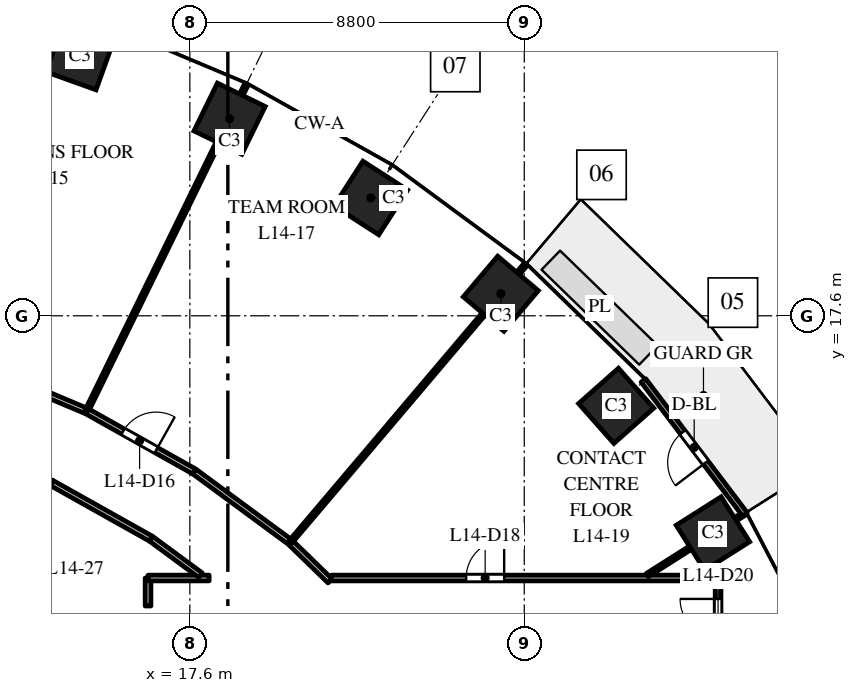
"""IFC4 building model, lengths in metres.
Left out: names, types, materials, properties, quantities, classifications, styles, units other than length and angle.
Written with IfcOpenShell. Run it as: python <this file> out.ifc"""

import sys

from ifc_helpers import new_model, si_unit, direction, frame, frame_2d, origin, origin_2d, place, context, subcontext, project, spatial, rectangle, extrude, element, fill, save


model = new_model("IFC4")
c1 = context("Model", 3, precision=1e-05, world=origin(), true_north=direction((0.0, 1.0)))
c2 = subcontext(c1, "Body", "Model", "MODEL_VIEW")
j1 = project(units=[si_unit("LENGTHUNIT", "METRE"), si_unit("PLANEANGLEUNIT", "RADIAN")], contexts=[c1])
p1 = place(None, origin())
s1 = spatial("IfcSite", under=j1, at=p1, CompositionType="ELEMENT")
p2 = place(p1, origin())
s2 = spatial("IfcBuilding", under=s1, at=p2, CompositionType="ELEMENT")
p3 = place(p2, frame((0.0, 0.0, 66.5)))
s3 = spatial("IfcBuildingStorey", under=s2, at=p3, CompositionType="ELEMENT", Elevation=66.5)
for number, where, z_axis, x_axis in (
    (1, (31.365, 11.871, 0.0), (0.0, 0.0, 1.0), (-0.535, 0.845, 0.0)),
    (2, (28.819, 15.23, 0.0), (0.0, 0.0, 1.0), (-0.663, 0.749, 0.0)),
    (3, (25.783, 18.18, 0.0), (0.0, 0.0, 1.0), (-0.763, 0.646, 0.0)),
    (4, (22.362, 20.7, 0.0), (0.0, 0.0, 1.0), (-0.84, 0.542, 0.0)),
    (5, (18.646, 22.785, 0.0), (0.0, 0.0, 1.0), (-0.898, 0.439, 0.0)),
    (6, (14.709, 24.441, 0.0), (0.0, 0.0, 1.0), (-0.941, 0.338, 0.0)),
):
    element("IfcColumn", number, at=place(p3, frame(where, z_axis=z_axis, x_axis=x_axis)), inside=s3, PredefinedType="COLUMN", context=c2, shape_type="SweptSolid", body=[
        extrude(rectangle(XDim=1.4, YDim=1.4, at=origin_2d()), origin(), (0.0, 0.0, 1.0), 4.0),
    ])
p4 = place(p3, frame((32.208, 12.374, 0.0), z_axis=(0.0, 0.0, 1.0), x_axis=(-0.604045763106, 0.796949632081, 0.0)))
e7 = element("IfcWall", 7, at=p4, inside=s3, PredefinedType="STANDARD", context=c2, shape_type="SweptSolid", body=[
    extrude(rectangle(XDim=4.423, YDim=0.15, at=frame_2d((2.212, 0.0))), origin(), (0.0, 0.0, 1.0), 3.7),
])
p5 = place(p4, frame((1.712, 0.0, 0.0)))
e8 = element("IfcOpeningElement", 8, at=p5, cuts=e7, PredefinedType="OPENING", context=c2, shape_type="SweptSolid", body=[
    extrude(rectangle(XDim=1.0, YDim=2.4, at=frame_2d((0.5, 1.2))), frame((0.0, 0.085, 0.0), z_axis=(0.0, -1.0, 0.0), x_axis=(1.0, 0.0, 0.0)), (0.0, 0.0, 1.0), 0.17),
])
p6 = place(p3, frame((11.101, 14.405, 0.0), z_axis=(0.0, 0.0, 1.0), x_axis=(0.921753827375, -0.387775555857, 0.0)))
e9 = element("IfcWall", 9, at=p6, inside=s3, PredefinedType="PARTITIONING", context=c2, shape_type="SweptSolid", body=[
    extrude(rectangle(XDim=3.103, YDim=0.15, at=frame_2d((1.551, 0.0))), origin(), (0.0, 0.0, 1.0), 3.7),
])
p7 = place(p3, frame((11.812, 16.384, 0.0), z_axis=(0.0, 0.0, 1.0), x_axis=(0.921839278558, -0.387572373252, 0.0)))
e10 = element("IfcWall", 10, at=p7, inside=s3, PredefinedType="PARTITIONING", context=c2, shape_type="SweptSolid", body=[
    extrude(rectangle(XDim=3.333, YDim=0.15, at=frame_2d((1.667, 0.0))), origin(), (0.0, 0.0, 1.0), 3.7),
])
p8 = place(p3, frame((13.961, 13.202, 0.0), z_axis=(0.0, 0.0, 1.0), x_axis=(0.872164226045, -0.489213207924, 0.0)))
e11 = element("IfcWall", 11, at=p8, inside=s3, PredefinedType="PARTITIONING", context=c2, shape_type="SweptSolid", body=[
    extrude(rectangle(XDim=2.998, YDim=0.15, at=frame_2d((1.499, 0.0))), origin(), (0.0, 0.0, 1.0), 3.7),
])
p9 = place(p3, frame((14.887, 15.096, 0.0), z_axis=(0.0, 0.0, 1.0), x_axis=(0.439197765869, 0.89839040648, 0.0)))
e12 = element("IfcWall", 12, at=p9, inside=s3, PredefinedType="PARTITIONING", context=c2, shape_type="SweptSolid", body=[
    extrude(rectangle(XDim=9.561, YDim=0.1, at=frame_2d((4.78, 0.0))), origin(), (0.0, 0.0, 1.0), 2.85),
])
p10 = place(p3, frame((14.902, 15.082, 0.0), z_axis=(0.0, 0.0, 1.0), x_axis=(0.872144615544, -0.489248167679, 0.0)))
e13 = element("IfcWall", 13, at=p10, inside=s3, PredefinedType="PARTITIONING", context=c2, shape_type="SweptSolid", body=[
    extrude(rectangle(XDim=3.228, YDim=0.15, at=frame_2d((1.614, 0.0))), origin(), (0.0, 0.0, 1.0), 3.7),
])
p11 = place(p10, frame((1.078, 0.0, 0.0)))
e14 = element("IfcOpeningElement", 14, at=p11, cuts=e13, PredefinedType="OPENING", context=c2, shape_type="SweptSolid", body=[
    extrude(rectangle(XDim=1.0, YDim=2.1, at=frame_2d((0.5, 1.05))), frame((0.0, 0.085, 0.0), z_axis=(0.0, -1.0, 0.0), x_axis=(1.0, 0.0, 0.0)), (0.0, 0.0, 1.0), 0.17),
])
p12 = place(p3, frame((16.5, 9.964, 0.0), z_axis=(0.0, 0.0, 1.0), x_axis=(0.0, 1.0, 0.0)))
e15 = element("IfcWall", 15, at=p12, inside=s3, PredefinedType="PARTITIONING", context=c2, shape_type="SweptSolid", body=[
    extrude(rectangle(XDim=0.736, YDim=0.15, at=frame_2d((0.368, 0.0))), origin(), (0.0, 0.0, 1.0), 3.7),
])
p13 = place(p3, frame((16.5, 10.7, 0.0), z_axis=(0.0, 0.0, 1.0), x_axis=(1.0, 0.0, 0.0)))
e16 = element("IfcWall", 16, at=p13, inside=s3, PredefinedType="PARTITIONING", context=c2, shape_type="SweptSolid", body=[
    extrude(rectangle(XDim=1.607, YDim=0.15, at=frame_2d((0.803, 0.0))), origin(), (0.0, 0.0, 1.0), 3.7),
])
p14 = place(p3, frame((16.576, 11.735, 0.0), z_axis=(0.0, 0.0, 1.0), x_axis=(0.805021714708, -0.593245344566, 0.0)))
e17 = element("IfcWall", 17, at=p14, inside=s3, PredefinedType="PARTITIONING", context=c2, shape_type="SweptSolid", body=[
    extrude(rectangle(XDim=1.619, YDim=0.15, at=frame_2d((0.809, 0.0))), origin(), (0.0, 0.0, 1.0), 3.7),
])
p15 = place(p3, frame((17.717, 13.503, 0.0), z_axis=(0.0, 0.0, 1.0), x_axis=(0.805106688633, -0.593130019404, 0.0)))
e18 = element("IfcWall", 18, at=p15, inside=s3, PredefinedType="PARTITIONING", context=c2, shape_type="SweptSolid", body=[
    extrude(rectangle(XDim=3.137, YDim=0.15, at=frame_2d((1.569, 0.0))), origin(), (0.0, 0.0, 1.0), 3.7),
])
p16 = place(p3, frame((20.245, 11.645, 0.0), z_axis=(0.0, 0.0, 1.0), x_axis=(0.646420249139, 0.762981560395, 0.0)))
e19 = element("IfcWall", 19, at=p16, inside=s3, PredefinedType="PARTITIONING", context=c2, shape_type="SweptSolid", body=[
    extrude(rectangle(XDim=9.568, YDim=0.1, at=frame_2d((4.784, 0.0))), origin(), (0.0, 0.0, 1.0), 2.85),
])
p17 = place(p3, frame((20.257, 11.628, 0.0), z_axis=(0.0, 0.0, 1.0), x_axis=(0.717129161976, -0.696940288005, 0.0)))
e20 = element("IfcWall", 20, at=p17, inside=s3, PredefinedType="PARTITIONING", context=c2, shape_type="SweptSolid", body=[
    extrude(rectangle(XDim=1.439, YDim=0.15, at=frame_2d((0.719, 0.0))), origin(), (0.0, 0.0, 1.0), 2.75),
])
p18 = place(p3, frame((21.32, 10.7, 0.0), z_axis=(0.0, 0.0, 1.0), x_axis=(1.0, 0.0, 0.0)))
e21 = element("IfcWall", 21, at=p18, inside=s3, PredefinedType="PARTITIONING", context=c2, shape_type="SweptSolid", body=[
    extrude(rectangle(XDim=10.18, YDim=0.15, at=frame_2d((5.09, 0.0))), origin(), (0.0, 0.0, 1.0), 2.85),
])
p19 = place(p18, frame((3.551, 0.0, 0.0)))
e22 = element("IfcOpeningElement", 22, at=p19, cuts=e21, PredefinedType="OPENING", context=c2, shape_type="SweptSolid", body=[
    extrude(rectangle(XDim=1.0, YDim=2.1, at=frame_2d((0.5, 1.05))), frame((0.0, 0.085, 0.0), z_axis=(0.0, -1.0, 0.0), x_axis=(1.0, 0.0, 0.0)), (0.0, 0.0, 1.0), 0.17),
])
p20 = place(p3, frame((29.637, 10.777, 0.0), z_axis=(0.0, 0.0, 1.0), x_axis=(0.844810627195, 0.535065420467, 0.0)))
e23 = element("IfcWall", 23, at=p20, inside=s3, PredefinedType="PARTITIONING", context=c2, shape_type="SweptSolid", body=[
    extrude(rectangle(XDim=3.048, YDim=0.1, at=frame_2d((1.524, 0.0))), origin(), (0.0, 0.0, 1.0), 2.85),
])
p21 = place(p3, frame((31.5, 8.5, 0.0), z_axis=(0.0, 0.0, 1.0), x_axis=(0.0, 1.0, 0.0)))
e24 = element("IfcWall", 24, at=p21, inside=s3, PredefinedType="PARTITIONING", context=c2, shape_type="SweptSolid", body=[
    extrude(rectangle(XDim=2.2, YDim=0.15, at=frame_2d((1.1, 0.0))), origin(), (0.0, 0.0, 1.0), 2.85),
])
p22 = place(p21, frame((0.65, 0.0, 0.0)))
e25 = element("IfcOpeningElement", 25, at=p22, cuts=e24, PredefinedType="OPENING", context=c2, shape_type="SweptSolid", body=[
    extrude(rectangle(XDim=1.0, YDim=2.1, at=frame_2d((0.5, 1.05))), frame((0.0, 0.085, 0.0), z_axis=(0.0, -1.0, 0.0), x_axis=(1.0, 0.0, 0.0)), (0.0, 0.0, 1.0), 0.17),
])
p23 = place(p5, origin())
e26 = element("IfcDoor", 26, at=p23, inside=s3, OperationType="SINGLE_SWING_LEFT", PredefinedType="DOOR", context=c2, shape_type="SweptSolid", body=[
    extrude(rectangle(XDim=1.0, YDim=2.4, at=frame_2d((0.5, 1.2))), frame((0.0, 0.025, 0.0), z_axis=(0.0, -1.0, 0.0), x_axis=(1.0, 0.0, 0.0)), (0.0, 0.0, 1.0), 0.05),
])
fill(e8, e26)
p24 = place(p11, origin())
e27 = element("IfcDoor", 27, at=p24, inside=s3, OperationType="SINGLE_SWING_RIGHT", PredefinedType="DOOR", context=c2, shape_type="SweptSolid", body=[
    extrude(rectangle(XDim=1.0, YDim=2.1, at=frame_2d((0.5, 1.05))), frame((0.0, 0.025, 0.0), z_axis=(0.0, -1.0, 0.0), x_axis=(1.0, 0.0, 0.0)), (0.0, 0.0, 1.0), 0.05),
])
fill(e14, e27)
p25 = place(p19, origin())
e28 = element("IfcDoor", 28, at=p25, inside=s3, OperationType="SINGLE_SWING_RIGHT", PredefinedType="DOOR", context=c2, shape_type="SweptSolid", body=[
    extrude(rectangle(XDim=1.0, YDim=2.1, at=frame_2d((0.5, 1.05))), frame((0.0, 0.025, 0.0), z_axis=(0.0, -1.0, 0.0), x_axis=(1.0, 0.0, 0.0)), (0.0, 0.0, 1.0), 0.05),
])
fill(e22, e28)
p26 = place(p22, origin())
e29 = element("IfcDoor", 29, at=p26, inside=s3, OperationType="SINGLE_SWING_RIGHT", PredefinedType="DOOR", context=c2, shape_type="SweptSolid", body=[
    extrude(rectangle(XDim=1.0, YDim=2.1, at=frame_2d((0.5, 1.05))), frame((0.0, 0.025, 0.0), z_axis=(0.0, -1.0, 0.0), x_axis=(1.0, 0.0, 0.0)), (0.0, 0.0, 1.0), 0.05),
])
fill(e25, e29)
save(model, sys.argv[1])
